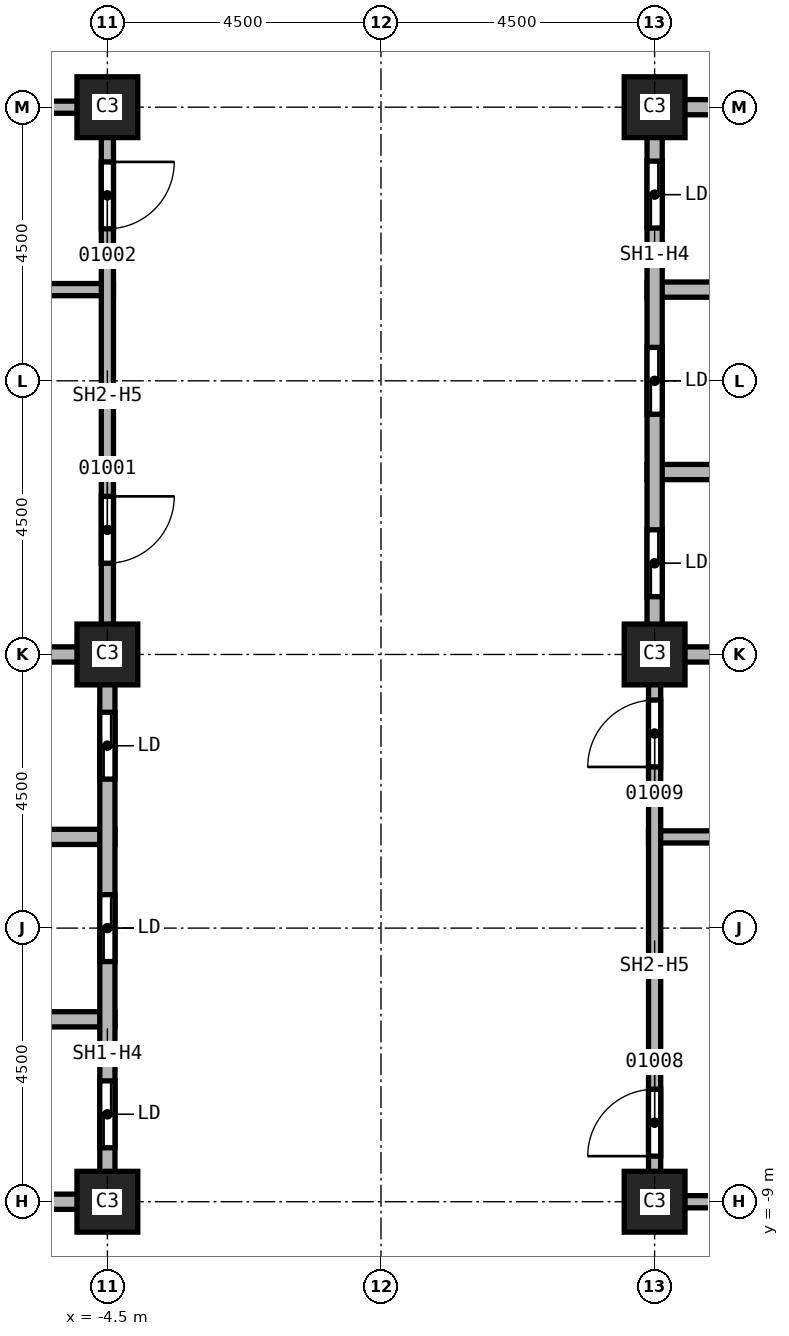
"""IFC4 building model, lengths in metres.
Left out: names, types, materials, properties, quantities, classifications, styles, units other than length and angle.
Written with IfcOpenShell. Run it as: python <this file> out.ifc"""

import sys

from ifc_helpers import new_model, si_unit, direction, frame, frame_2d, origin, origin_2d, place, context, subcontext, project, spatial, rectangle, extrude, element, fill, save


model = new_model("IFC4")
c1 = context("Model", 3, precision=1e-05, world=origin(), true_north=direction((0.0, 1.0)))
c2 = subcontext(c1, "Body", "Model", "MODEL_VIEW")
j1 = project(units=[si_unit("LENGTHUNIT", "METRE"), si_unit("PLANEANGLEUNIT", "RADIAN")], contexts=[c1])
p1 = place(None, origin())
s1 = spatial("IfcSite", under=j1, at=p1, CompositionType="ELEMENT")
p2 = place(p1, origin())
s2 = spatial("IfcBuilding", under=s1, at=p2, CompositionType="ELEMENT")
p3 = place(p2, frame((0.0, 0.0, 68.0)))
s3 = spatial("IfcBuildingStorey", under=s2, at=p3, CompositionType="ELEMENT", Elevation=68.0)
for number, where, z_axis, x_axis in (
    (1, (4.5, 0.0, 0.0), (0.0, 0.0, 1.0), (1.0, 0.0, 0.0)),
    (2, (4.5, 9.0, 0.0), (0.0, 0.0, 1.0), (1.0, 0.0, 0.0)),
    (3, (4.5, -9.0, 0.0), (0.0, 0.0, 1.0), (1.0, 0.0, 0.0)),
    (4, (-4.5, 0.0, 0.0), (0.0, 0.0, 1.0), (1.0, 0.0, 0.0)),
    (5, (-4.5, 9.0, 0.0), (0.0, 0.0, 1.0), (1.0, 0.0, 0.0)),
    (6, (-4.5, -9.0, 0.0), (0.0, 0.0, 1.0), (1.0, 0.0, 0.0)),
):
    element("IfcColumn", number, at=place(p3, frame(where, z_axis=z_axis, x_axis=x_axis)), inside=s3, PredefinedType="COLUMN", context=c2, shape_type="SweptSolid", body=[
        extrude(rectangle(XDim=1.0, YDim=1.0, at=origin_2d()), origin(), (0.0, 0.0, 1.0), 3.7),
    ])
p4 = place(p3, frame((-7.6, 6.0, 0.0), z_axis=(0.0, 0.0, 1.0), x_axis=(1.0, 0.0, 0.0)))
e7 = element("IfcWall", 7, at=p4, inside=s3, PredefinedType="SOLIDWALL", context=c2, shape_type="SweptSolid", body=[
    extrude(rectangle(XDim=3.2, YDim=0.2, at=frame_2d((1.6, 0.0))), origin(), (0.0, 0.0, 1.0), 3.7),
])
p5 = place(p3, frame((-7.5, 9.0, 0.0), z_axis=(0.0, 0.0, 1.0), x_axis=(1.0, 0.0, 0.0)))
e8 = element("IfcWall", 8, at=p5, inside=s3, PredefinedType="SOLIDWALL", context=c2, shape_type="SweptSolid", body=[
    extrude(rectangle(XDim=3.0, YDim=0.2, at=frame_2d((1.5, 0.0))), origin(), (0.0, 0.0, 1.0), 2.938),
])
p6 = place(p3, frame((-4.5, 9.1, 0.0), z_axis=(0.0, 0.0, 1.0), x_axis=(0.0, -1.0, 0.0)))
e9 = element("IfcWall", 9, at=p6, inside=s3, PredefinedType="SOLIDWALL", context=c2, shape_type="SweptSolid", body=[
    extrude(rectangle(XDim=9.1, YDim=0.2, at=frame_2d((4.55, 0.0))), origin(), (0.0, 0.0, 1.0), 2.938),
])
p7 = place(p6, frame((6.5, 0.0, 0.0)))
e10 = element("IfcOpeningElement", 10, at=p7, cuts=e9, PredefinedType="OPENING", context=c2, shape_type="SweptSolid", body=[
    extrude(rectangle(XDim=1.1, YDim=2.1, at=frame_2d((0.55, 1.05))), frame((0.0, 0.1, 0.0), z_axis=(0.0, -1.0, 0.0), x_axis=(1.0, 0.0, 0.0)), (0.0, 0.0, 1.0), 0.2),
])
p8 = place(p6, frame((1.0, 0.0, 0.0)))
e11 = element("IfcOpeningElement", 11, at=p8, cuts=e9, PredefinedType="OPENING", context=c2, shape_type="SweptSolid", body=[
    extrude(rectangle(XDim=1.1, YDim=2.1, at=frame_2d((0.55, 1.05))), frame((0.0, 0.1, 0.0), z_axis=(0.0, -1.0, 0.0), x_axis=(1.0, 0.0, 0.0)), (0.0, 0.0, 1.0), 0.2),
])
p9 = place(p3, frame((4.4, -3.0, 0.0), z_axis=(0.0, 0.0, 1.0), x_axis=(1.0, 0.0, 0.0)))
e12 = element("IfcWall", 12, at=p9, inside=s3, PredefinedType="SOLIDWALL", context=c2, shape_type="SweptSolid", body=[
    extrude(rectangle(XDim=3.225, YDim=0.2, at=frame_2d((1.613, 0.0))), origin(), (0.0, 0.0, 1.0), 3.7),
])
p10 = place(p3, frame((4.5, -9.1, 0.0), z_axis=(0.0, 0.0, 1.0), x_axis=(0.0, 1.0, 0.0)))
e13 = element("IfcWall", 13, at=p10, inside=s3, PredefinedType="SOLIDWALL", context=c2, shape_type="SweptSolid", body=[
    extrude(rectangle(XDim=9.1, YDim=0.2, at=frame_2d((4.55, 0.0))), origin(), (0.0, 0.0, 1.0), 2.938),
])
p11 = place(p10, frame((0.85, 0.0, 0.0)))
e14 = element("IfcOpeningElement", 14, at=p11, cuts=e13, PredefinedType="OPENING", context=c2, shape_type="SweptSolid", body=[
    extrude(rectangle(XDim=1.1, YDim=2.1, at=frame_2d((0.55, 1.05))), frame((0.0, 0.1, 0.0), z_axis=(0.0, -1.0, 0.0), x_axis=(1.0, 0.0, 0.0)), (0.0, 0.0, 1.0), 0.2),
])
p12 = place(p10, frame((7.25, 0.0, 0.0)))
e15 = element("IfcOpeningElement", 15, at=p12, cuts=e13, PredefinedType="OPENING", context=c2, shape_type="SweptSolid", body=[
    extrude(rectangle(XDim=1.1, YDim=2.1, at=frame_2d((0.55, 1.05))), frame((0.0, 0.1, 0.0), z_axis=(0.0, -1.0, 0.0), x_axis=(1.0, 0.0, 0.0)), (0.0, 0.0, 1.0), 0.2),
])
p13 = place(p3, frame((7.5, -9.0, 0.0), z_axis=(0.0, 0.0, 1.0), x_axis=(-1.0, 0.0, 0.0)))
e16 = element("IfcWall", 16, at=p13, inside=s3, PredefinedType="SOLIDWALL", context=c2, shape_type="SweptSolid", body=[
    extrude(rectangle(XDim=3.0, YDim=0.2, at=frame_2d((1.5, 0.0))), origin(), (0.0, 0.0, 1.0), 2.938),
])
p14 = place(p3, frame((-13.625, -3.0, 0.0), z_axis=(0.0, 0.0, 1.0), x_axis=(1.0, 0.0, 0.0)))
e17 = element("IfcWall", 17, at=p14, inside=s3, PredefinedType="SOLIDWALL", context=c2, shape_type="SweptSolid", body=[
    extrude(rectangle(XDim=9.25, YDim=0.25, at=frame_2d((4.625, 0.0))), origin(), (0.0, 0.0, 1.0), 3.7),
])
p15 = place(p14, frame((3.25, 0.0, 0.0)))
e18 = element("IfcOpeningElement", 18, at=p15, cuts=e17, PredefinedType="OPENING", context=c2, shape_type="SweptSolid", body=[
    extrude(rectangle(XDim=1.1, YDim=2.1, at=frame_2d((0.55, 1.05))), frame((0.0, 0.125, 0.0), z_axis=(0.0, -1.0, 0.0), x_axis=(1.0, 0.0, 0.0)), (0.0, 0.0, 1.0), 0.25),
])
for number, where, z_axis, x_axis in (
    (19, (-7.625, -6.0, 0.0), (0.0, 0.0, 1.0), (1.0, 0.0, 0.0)),
    (20, (-7.625, 0.0, 0.0), (0.0, 0.0, 1.0), (1.0, 0.0, 0.0)),
):
    element("IfcWall", number, at=place(p3, frame(where, z_axis=z_axis, x_axis=x_axis)), inside=s3, PredefinedType="SOLIDWALL", context=c2, shape_type="SweptSolid", body=[
        extrude(rectangle(XDim=3.25, YDim=0.25, at=frame_2d((1.625, 0.0))), origin(), (0.0, 0.0, 1.0), 3.7),
    ])
p16 = place(p3, frame((-4.5, -9.0, 0.0), z_axis=(0.0, 0.0, 1.0), x_axis=(-1.0, 0.0, 0.0)))
e21 = element("IfcWall", 21, at=p16, inside=s3, PredefinedType="SOLIDWALL", context=c2, shape_type="SweptSolid", body=[
    extrude(rectangle(XDim=3.0, YDim=0.25, at=frame_2d((1.5, 0.0))), origin(), (0.0, 0.0, 1.0), 2.938),
])
p17 = place(p3, frame((-4.5, 0.0, 0.0), z_axis=(0.0, 0.0, 1.0), x_axis=(0.0, -1.0, 0.0)))
e22 = element("IfcWall", 22, at=p17, inside=s3, PredefinedType="SOLIDWALL", context=c2, shape_type="SweptSolid", body=[
    extrude(rectangle(XDim=9.125, YDim=0.25, at=frame_2d((4.562, 0.0))), origin(), (0.0, 0.0, 1.0), 2.938),
])
p18 = place(p17, frame((7.012, 0.0, 0.0)))
e23 = element("IfcOpeningElement", 23, at=p18, cuts=e22, PredefinedType="OPENING", context=c2, shape_type="SweptSolid", body=[
    extrude(rectangle(XDim=1.1, YDim=2.1, at=frame_2d((0.55, 1.05))), frame((0.0, 0.125, 0.0), z_axis=(0.0, -1.0, 0.0), x_axis=(1.0, 0.0, 0.0)), (0.0, 0.0, 1.0), 0.25),
])
p19 = place(p17, frame((3.95, 0.0, 0.0)))
e24 = element("IfcOpeningElement", 24, at=p19, cuts=e22, PredefinedType="OPENING", context=c2, shape_type="SweptSolid", body=[
    extrude(rectangle(XDim=1.1, YDim=2.1, at=frame_2d((0.55, 1.05))), frame((0.0, 0.125, 0.0), z_axis=(0.0, -1.0, 0.0), x_axis=(1.0, 0.0, 0.0)), (0.0, 0.0, 1.0), 0.25),
])
p20 = place(p17, frame((0.95, 0.0, 0.0)))
e25 = element("IfcOpeningElement", 25, at=p20, cuts=e22, PredefinedType="OPENING", context=c2, shape_type="SweptSolid", body=[
    extrude(rectangle(XDim=1.1, YDim=2.1, at=frame_2d((0.55, 1.05))), frame((0.0, 0.125, 0.0), z_axis=(0.0, -1.0, 0.0), x_axis=(1.0, 0.0, 0.0)), (0.0, 0.0, 1.0), 0.25),
])
p21 = place(p3, frame((4.375, 0.0, 0.0), z_axis=(0.0, 0.0, 1.0), x_axis=(1.0, 0.0, 0.0)))
e26 = element("IfcWall", 26, at=p21, inside=s3, PredefinedType="SOLIDWALL", context=c2, shape_type="SweptSolid", body=[
    extrude(rectangle(XDim=3.25, YDim=0.25, at=frame_2d((1.625, 0.0))), origin(), (0.0, 0.0, 1.0), 3.7),
])
p22 = place(p3, frame((4.375, 3.0, 0.0), z_axis=(0.0, 0.0, 1.0), x_axis=(1.0, 0.0, 0.0)))
e27 = element("IfcWall", 27, at=p22, inside=s3, PredefinedType="SOLIDWALL", context=c2, shape_type="SweptSolid", body=[
    extrude(rectangle(XDim=9.25, YDim=0.25, at=frame_2d((4.625, 0.0))), origin(), (0.0, 0.0, 1.0), 3.7),
])
p23 = place(p22, frame((3.375, 0.0, 0.0)))
e28 = element("IfcOpeningElement", 28, at=p23, cuts=e27, PredefinedType="OPENING", context=c2, shape_type="SweptSolid", body=[
    extrude(rectangle(XDim=1.1, YDim=2.1, at=frame_2d((0.55, 1.05))), frame((0.0, 0.125, 0.0), z_axis=(0.0, -1.0, 0.0), x_axis=(1.0, 0.0, 0.0)), (0.0, 0.0, 1.0), 0.25),
])
p24 = place(p3, frame((4.375, 6.0, 0.0), z_axis=(0.0, 0.0, 1.0), x_axis=(1.0, 0.0, 0.0)))
e29 = element("IfcWall", 29, at=p24, inside=s3, PredefinedType="SOLIDWALL", context=c2, shape_type="SweptSolid", body=[
    extrude(rectangle(XDim=3.25, YDim=0.25, at=frame_2d((1.625, 0.0))), origin(), (0.0, 0.0, 1.0), 3.7),
])
p25 = place(p3, frame((4.5, 0.0, 0.0), z_axis=(0.0, 0.0, 1.0), x_axis=(0.0, 1.0, 0.0)))
e30 = element("IfcWall", 30, at=p25, inside=s3, PredefinedType="SOLIDWALL", context=c2, shape_type="SweptSolid", body=[
    extrude(rectangle(XDim=9.125, YDim=0.25, at=frame_2d((4.562, 0.0))), origin(), (0.0, 0.0, 1.0), 2.938),
])
p26 = place(p25, frame((0.95, 0.0, 0.0)))
e31 = element("IfcOpeningElement", 31, at=p26, cuts=e30, PredefinedType="OPENING", context=c2, shape_type="SweptSolid", body=[
    extrude(rectangle(XDim=1.1, YDim=2.1, at=frame_2d((0.55, 1.05))), frame((0.0, 0.125, 0.0), z_axis=(0.0, -1.0, 0.0), x_axis=(1.0, 0.0, 0.0)), (0.0, 0.0, 1.0), 0.25),
])
p27 = place(p25, frame((3.95, 0.0, 0.0)))
e32 = element("IfcOpeningElement", 32, at=p27, cuts=e30, PredefinedType="OPENING", context=c2, shape_type="SweptSolid", body=[
    extrude(rectangle(XDim=1.1, YDim=2.1, at=frame_2d((0.55, 1.05))), frame((0.0, 0.125, 0.0), z_axis=(0.0, -1.0, 0.0), x_axis=(1.0, 0.0, 0.0)), (0.0, 0.0, 1.0), 0.25),
])
p28 = place(p25, frame((7.012, 0.0, 0.0)))
e33 = element("IfcOpeningElement", 33, at=p28, cuts=e30, PredefinedType="OPENING", context=c2, shape_type="SweptSolid", body=[
    extrude(rectangle(XDim=1.1, YDim=2.1, at=frame_2d((0.55, 1.05))), frame((0.0, 0.125, 0.0), z_axis=(0.0, -1.0, 0.0), x_axis=(1.0, 0.0, 0.0)), (0.0, 0.0, 1.0), 0.25),
])
p29 = place(p3, frame((4.5, 9.0, 0.0), z_axis=(0.0, 0.0, 1.0), x_axis=(1.0, 0.0, 0.0)))
e34 = element("IfcWall", 34, at=p29, inside=s3, PredefinedType="SOLIDWALL", context=c2, shape_type="SweptSolid", body=[
    extrude(rectangle(XDim=3.0, YDim=0.25, at=frame_2d((1.5, 0.0))), origin(), (0.0, 0.0, 1.0), 2.938),
])
p30 = place(p7, origin())
e35 = element("IfcDoor", 35, at=p30, inside=s3, OperationType="SINGLE_SWING_RIGHT", PredefinedType="DOOR", context=c2, shape_type="SweptSolid", body=[
    extrude(rectangle(XDim=1.1, YDim=2.1, at=frame_2d((0.55, 1.05))), frame((0.0, 0.025, 0.0), z_axis=(0.0, -1.0, 0.0), x_axis=(1.0, 0.0, 0.0)), (0.0, 0.0, 1.0), 0.05),
])
fill(e10, e35)
p31 = place(p8, origin())
e36 = element("IfcDoor", 36, at=p31, inside=s3, OperationType="SINGLE_SWING_LEFT", PredefinedType="DOOR", context=c2, shape_type="SweptSolid", body=[
    extrude(rectangle(XDim=1.1, YDim=2.1, at=frame_2d((0.55, 1.05))), frame((0.0, 0.025, 0.0), z_axis=(0.0, -1.0, 0.0), x_axis=(1.0, 0.0, 0.0)), (0.0, 0.0, 1.0), 0.05),
])
fill(e11, e36)
p32 = place(p11, origin())
e37 = element("IfcDoor", 37, at=p32, inside=s3, OperationType="SINGLE_SWING_LEFT", PredefinedType="DOOR", context=c2, shape_type="SweptSolid", body=[
    extrude(rectangle(XDim=1.1, YDim=2.1, at=frame_2d((0.55, 1.05))), frame((0.0, 0.025, 0.0), z_axis=(0.0, -1.0, 0.0), x_axis=(1.0, 0.0, 0.0)), (0.0, 0.0, 1.0), 0.05),
])
fill(e14, e37)
p33 = place(p12, origin())
e38 = element("IfcDoor", 38, at=p33, inside=s3, OperationType="SINGLE_SWING_RIGHT", PredefinedType="DOOR", context=c2, shape_type="SweptSolid", body=[
    extrude(rectangle(XDim=1.1, YDim=2.1, at=frame_2d((0.55, 1.05))), frame((0.0, 0.025, 0.0), z_axis=(0.0, -1.0, 0.0), x_axis=(1.0, 0.0, 0.0)), (0.0, 0.0, 1.0), 0.05),
])
fill(e15, e38)
p34 = place(p18, origin())
e39 = element("IfcDoor", 39, at=p34, inside=s3, OperationType="SLIDING_TO_LEFT", PredefinedType="DOOR", context=c2, shape_type="SweptSolid", body=[
    extrude(rectangle(XDim=1.1, YDim=2.1, at=frame_2d((0.55, 1.05))), frame((0.0, 0.025, 0.0), z_axis=(0.0, -1.0, 0.0), x_axis=(1.0, 0.0, 0.0)), (0.0, 0.0, 1.0), 0.05),
])
fill(e23, e39)
p35 = place(p19, origin())
e40 = element("IfcDoor", 40, at=p35, inside=s3, OperationType="SLIDING_TO_LEFT", PredefinedType="DOOR", context=c2, shape_type="SweptSolid", body=[
    extrude(rectangle(XDim=1.1, YDim=2.1, at=frame_2d((0.55, 1.05))), frame((0.0, 0.025, 0.0), z_axis=(0.0, -1.0, 0.0), x_axis=(1.0, 0.0, 0.0)), (0.0, 0.0, 1.0), 0.05),
])
fill(e24, e40)
p36 = place(p20, origin())
e41 = element("IfcDoor", 41, at=p36, inside=s3, OperationType="SLIDING_TO_LEFT", PredefinedType="DOOR", context=c2, shape_type="SweptSolid", body=[
    extrude(rectangle(XDim=1.1, YDim=2.1, at=frame_2d((0.55, 1.05))), frame((0.0, 0.025, 0.0), z_axis=(0.0, -1.0, 0.0), x_axis=(1.0, 0.0, 0.0)), (0.0, 0.0, 1.0), 0.05),
])
fill(e25, e41)
p37 = place(p26, origin())
e42 = element("IfcDoor", 42, at=p37, inside=s3, OperationType="SLIDING_TO_LEFT", PredefinedType="DOOR", context=c2, shape_type="SweptSolid", body=[
    extrude(rectangle(XDim=1.1, YDim=2.1, at=frame_2d((0.55, 1.05))), frame((0.0, 0.025, 0.0), z_axis=(0.0, -1.0, 0.0), x_axis=(1.0, 0.0, 0.0)), (0.0, 0.0, 1.0), 0.05),
])
fill(e31, e42)
p38 = place(p27, origin())
e43 = element("IfcDoor", 43, at=p38, inside=s3, OperationType="SLIDING_TO_LEFT", PredefinedType="DOOR", context=c2, shape_type="SweptSolid", body=[
    extrude(rectangle(XDim=1.1, YDim=2.1, at=frame_2d((0.55, 1.05))), frame((0.0, 0.025, 0.0), z_axis=(0.0, -1.0, 0.0), x_axis=(1.0, 0.0, 0.0)), (0.0, 0.0, 1.0), 0.05),
])
fill(e32, e43)
p39 = place(p28, origin())
e44 = element("IfcDoor", 44, at=p39, inside=s3, OperationType="SLIDING_TO_LEFT", PredefinedType="DOOR", context=c2, shape_type="SweptSolid", body=[
    extrude(rectangle(XDim=1.1, YDim=2.1, at=frame_2d((0.55, 1.05))), frame((0.0, 0.025, 0.0), z_axis=(0.0, -1.0, 0.0), x_axis=(1.0, 0.0, 0.0)), (0.0, 0.0, 1.0), 0.05),
])
fill(e33, e44)
save(model, sys.argv[1])
